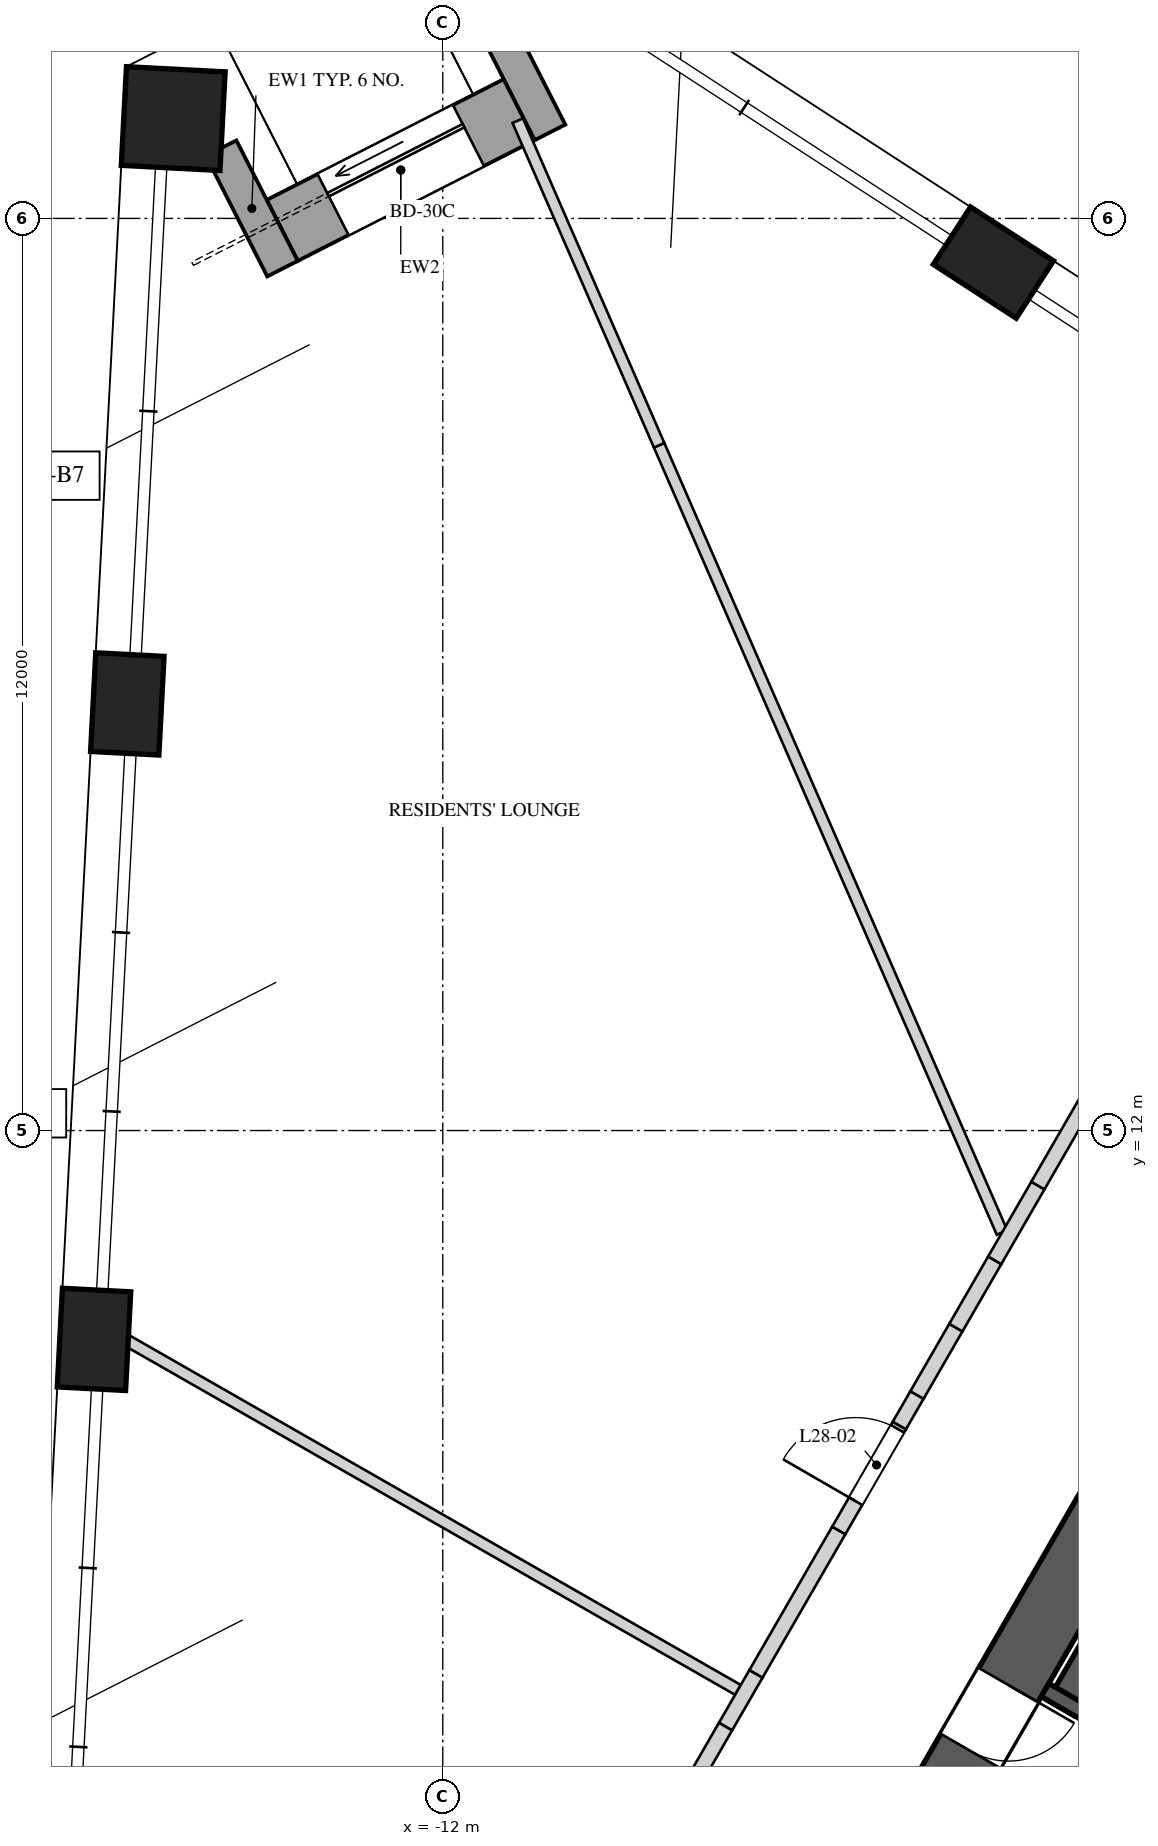
"""IFC4 building model, lengths in metres.
Left out: names, types, materials, properties, quantities, classifications, styles, units other than length and angle.
Written with IfcOpenShell. Run it as: python <this file> out.ifc"""

import sys

from ifc_helpers import new_model, si_unit, direction, frame, frame_2d, origin, origin_2d, place, context, subcontext, project, spatial, polyline, rectangle, outline, extrude, element, fill, save


model = new_model("IFC4")
c1 = context("Model", 3, precision=1e-05, world=origin(), true_north=direction((0.0, 1.0)))
c2 = subcontext(c1, "Body", "Model", "MODEL_VIEW")
j1 = project(units=[si_unit("LENGTHUNIT", "METRE"), si_unit("PLANEANGLEUNIT", "RADIAN")], contexts=[c1])
p1 = place(None, origin())
s1 = spatial("IfcSite", under=j1, at=p1, CompositionType="ELEMENT")
p2 = place(p1, origin())
s2 = spatial("IfcBuilding", under=s1, at=p2, CompositionType="ELEMENT")
p3 = place(p2, frame((0.0, 0.0, 125.6)))
s3 = spatial("IfcBuildingStorey", under=s2, at=p3, CompositionType="ELEMENT", Elevation=125.6)
p4 = place(p3, frame((-1.184, 10.55, 0.0), z_axis=(0.0, 0.0, 1.0), x_axis=(-0.500004814304, -0.866022624227, 0.0)))
e1 = element("IfcWall", 1, at=p4, inside=s3, PredefinedType="SHEAR", context=c2, shape_type="SweptSolid", body=[
    extrude(rectangle(XDim=17.09, YDim=0.9, at=frame_2d((8.545, 0.0))), origin(), (0.0, 0.0, 1.0), 4.0),
])
p5 = place(p4, frame((6.75, 0.0, 0.0)))
e2 = element("IfcOpeningElement", 2, at=p5, cuts=e1, PredefinedType="OPENING", context=c2, shape_type="SweptSolid", body=[
    extrude(rectangle(XDim=1.0, YDim=2.4, at=frame_2d((0.5, 1.2))), frame((0.0, 0.46, 0.0), z_axis=(0.0, -1.0, 0.0), x_axis=(1.0, 0.0, 0.0)), (0.0, 0.0, 1.0), 0.92),
])
p6 = place(p4, frame((14.678, 0.0, 0.0)))
e3 = element("IfcOpeningElement", 3, at=p6, cuts=e1, PredefinedType="OPENING", context=c2, shape_type="SweptSolid", body=[
    extrude(rectangle(XDim=0.8, YDim=2.1, at=frame_2d((0.4, 1.05))), frame((0.0, 0.46, 0.0), z_axis=(0.0, -1.0, 0.0), x_axis=(1.0, 0.0, 0.0)), (0.0, 0.0, 1.0), 0.92),
])
p7 = place(p3, frame((-15.547, 25.313, -0.35), z_axis=(0.0, 0.0, 1.0), x_axis=(-0.052335956243, -0.998629534755, 0.0)))
e4 = element("IfcColumn", 4, at=p7, inside=s3, PredefinedType="COLUMN", context=c2, shape_type="SweptSolid", body=[
    extrude(rectangle(XDim=1.3, YDim=1.3, at=origin_2d()), origin(), (0.0, 0.0, 1.0), 4.35),
])
for number, where, z_axis, x_axis in (
    (5, (-16.15, 17.613, -0.35), (0.0, 0.0, 1.0), (-0.052, -0.999, 0.0)),
    (6, (-16.588, 9.252, -0.35), (0.0, 0.0, 1.0), (-0.052, -0.999, 0.0)),
    (7, (-4.756, 23.418, -0.35), (0.0, 0.0, 1.0), (-0.839, 0.545, 0.0)),
):
    element("IfcColumn", number, at=place(p3, frame(where, z_axis=z_axis, x_axis=x_axis)), inside=s3, PredefinedType="COLUMN", context=c2, shape_type="SweptSolid", body=[
        extrude(rectangle(XDim=1.3, YDim=0.9, at=origin_2d()), origin(), (0.0, 0.0, 1.0), 4.35),
    ])
p8 = place(p3, frame((-14.112, 23.842, 0.0), z_axis=(0.0, 0.0, 1.0), x_axis=(0.890983062796, 0.454036542374, 0.0)))
e8 = element("IfcWall", 8, at=p8, inside=s3, PredefinedType="SOLIDWALL", context=c2, shape_type="SweptSolid", body=[
    extrude(rectangle(XDim=3.5, YDim=0.9, at=frame_2d((1.75, 0.0))), origin(), (0.0, 0.0, 1.0), 3.3),
])
p9 = place(p8, frame((0.75, 0.0, 0.0)))
e9 = element("IfcOpeningElement", 9, at=p9, cuts=e8, PredefinedType="OPENING", context=c2, shape_type="SweptSolid", body=[
    extrude(rectangle(XDim=2.0, YDim=2.4, at=frame_2d((1.0, 1.2))), frame((0.0, 0.46, 0.0), z_axis=(0.0, -1.0, 0.0), x_axis=(1.0, 0.0, 0.0)), (0.0, 0.0, 1.0), 0.92),
])
for number, where, z_axis, x_axis in (
    (10, (-14.916, 24.924, 0.0), (0.0, 0.0, 1.0), (0.454, -0.891, 0.0)),
    (11, (-11.396, 26.717, 0.0), (0.0, 0.0, 1.0), (0.454, -0.891, 0.0)),
):
    element("IfcWall", number, at=place(p3, frame(where, z_axis=z_axis, x_axis=x_axis)), inside=s3, PredefinedType="SOLIDWALL", context=c2, shape_type="SweptSolid", body=[
        extrude(rectangle(XDim=1.779, YDim=0.45, at=frame_2d((0.89, 0.0))), origin(), (0.0, 0.0, 1.0), 2.55),
    ])
p10 = place(p3, frame((-0.766, 9.772, 0.0), z_axis=(0.0, 0.0, 1.0), x_axis=(-0.500009909098, -0.866019682689, 0.0)))
e12 = element("IfcWall", 12, at=p10, inside=s3, PredefinedType="SOLIDWALL", context=c2, shape_type="SweptSolid", body=[
    extrude(rectangle(XDim=6.2, YDim=0.4, at=frame_2d((3.1, 0.0))), origin(), (0.0, 0.0, 1.0), 3.65),
])
p11 = place(p3, frame((-1.521, 3.165, 0.0), z_axis=(0.0, 0.0, 1.0), x_axis=(-0.866039495442, 0.49997559174, 0.0)))
e13 = element("IfcWall", 13, at=p11, inside=s3, PredefinedType="SOLIDWALL", context=c2, shape_type="SweptSolid", body=[
    extrude(rectangle(XDim=2.95, YDim=0.2, at=frame_2d((1.475, 0.0))), origin(), (0.0, 0.0, 1.0), 3.65),
])
p12 = place(p11, frame((0.725, 0.0, 0.0)))
e14 = element("IfcOpeningElement", 14, at=p12, cuts=e13, PredefinedType="OPENING", context=c2, shape_type="SweptSolid", body=[
    extrude(rectangle(XDim=1.1, YDim=2.4, at=frame_2d((0.55, 1.2))), frame((0.0, 0.11, 0.0), z_axis=(0.0, -1.0, 0.0), x_axis=(1.0, 0.0, 0.0)), (0.0, 0.0, 1.0), 0.22),
])
p13 = place(p3, frame((-8.117, 4.641, 0.0), z_axis=(0.0, 0.0, 1.0), x_axis=(-0.868089906789, 0.496407004111, 0.0)))
e15 = element("IfcWall", 15, at=p13, inside=s3, PredefinedType="PARTITIONING", context=c2, shape_type="SweptSolid", body=[
    extrude(rectangle(XDim=9.611, YDim=0.15, at=frame_2d((4.806, 0.0))), origin(), (0.0, 0.0, 1.0), 2.75),
])
p14 = place(p3, frame((-4.643, 10.659, 0.0), z_axis=(0.0, 0.0, 1.0), x_axis=(-0.399345585852, 0.916800470692, 0.0)))
e16 = element("IfcWall", 16, at=p14, inside=s3, PredefinedType="PARTITIONING", context=c2, shape_type="SweptSolid", body=[
    extrude(rectangle(XDim=11.297, YDim=0.15, at=frame_2d((5.648, 0.0))), origin(), (0.0, 0.0, 1.0), 2.55),
])
p15 = place(p3, frame((-9.154, 21.015, 0.0), z_axis=(0.0, 0.0, 1.0), x_axis=(-0.399333563101, 0.916805707542, 0.0)))
e17 = element("IfcWall", 17, at=p15, inside=s3, PredefinedType="PARTITIONING", context=c2, shape_type="SweptSolid", body=[
    extrude(rectangle(XDim=4.658, YDim=0.15, at=frame_2d((2.329, 0.0))), origin(), (0.0, 0.0, 1.0), 3.65),
])
p16 = place(p3, frame((-10.171, 0.884, 0.0), z_axis=(0.0, 0.0, 1.0), x_axis=(0.499998034377, 0.866026538634, 0.0)))
e18 = element("IfcWall", 18, at=p16, inside=s3, PredefinedType="SOLIDWALL", context=c2, shape_type="SweptSolid", body=[
    extrude(rectangle(XDim=3.783, YDim=0.2, at=frame_2d((1.892, 0.0))), origin(), (0.0, 0.0, 1.0), 3.65),
])
p17 = place(p3, frame((-8.279, 4.16, 0.0), z_axis=(0.0, 0.0, 1.0), x_axis=(0.500109828528, 0.865961984968, 0.0)))
e19 = element("IfcWall", 19, at=p17, inside=s3, PredefinedType="SOLIDWALL", context=c2, shape_type="SweptSolid", body=[
    extrude(rectangle(XDim=0.8, YDim=0.2, at=frame_2d((0.4, 0.0))), origin(), (0.0, 0.0, 1.0), 2.75),
])
p18 = place(p3, frame((-7.879, 4.853, 0.0), z_axis=(0.0, 0.0, 1.0), x_axis=(0.499948868167, 0.866054922749, 0.0)))
e20 = element("IfcWall", 20, at=p18, inside=s3, PredefinedType="SOLIDWALL", context=c2, shape_type="SweptSolid", body=[
    extrude(rectangle(XDim=2.178, YDim=0.2, at=frame_2d((1.089, 0.0))), origin(), (0.0, 0.0, 1.0), 3.65),
])
p19 = place(p3, frame((-6.79, 6.739, 0.0), z_axis=(0.0, 0.0, 1.0), x_axis=(0.500009674092, 0.866019818373, 0.0)))
e21 = element("IfcWall", 21, at=p19, inside=s3, PredefinedType="SOLIDWALL", context=c2, shape_type="SweptSolid", body=[
    extrude(outline(polyline([(0.0, 0.0), (1.594, 0.0), (1.594, 3.65), (0.944, 3.65), (0.944, 2.55), (0.0, 2.55), (0.0, 0.0)])), frame((0.0, 0.1, 0.0), z_axis=(0.0, -1.0, 0.0), x_axis=(1.0, 0.0, 0.0)), (0.0, 0.0, 1.0), 0.2),
])
p20 = place(p19, frame((0.444, 0.0, 0.0)))
e22 = element("IfcOpeningElement", 22, at=p20, cuts=e21, PredefinedType="OPENING", context=c2, shape_type="SweptSolid", body=[
    extrude(rectangle(XDim=1.1, YDim=2.4, at=frame_2d((0.55, 1.2))), frame((0.0, 0.11, 0.0), z_axis=(0.0, -1.0, 0.0), x_axis=(1.0, 0.0, 0.0)), (0.0, 0.0, 1.0), 0.22),
])
p21 = place(p3, frame((-5.993, 8.12, 0.0), z_axis=(0.0, 0.0, 1.0), x_axis=(0.499935264145, 0.866062775822, 0.0)))
e23 = element("IfcWall", 23, at=p21, inside=s3, PredefinedType="SOLIDWALL", context=c2, shape_type="SweptSolid", body=[
    extrude(rectangle(XDim=0.463, YDim=0.2, at=frame_2d((0.232, 0.0))), origin(), (0.0, 0.0, 1.0), 3.65),
])
p22 = place(p3, frame((-5.761, 8.521, 0.0), z_axis=(0.0, 0.0, 1.0), x_axis=(0.500114680815, 0.86595918266, 0.0)))
e24 = element("IfcWall", 24, at=p22, inside=s3, PredefinedType="SOLIDWALL", context=c2, shape_type="SweptSolid", body=[
    extrude(rectangle(XDim=1.024, YDim=0.2, at=frame_2d((0.512, 0.0))), origin(), (0.0, 0.0, 1.0), 2.55),
])
p23 = place(p3, frame((-5.25, 9.407, 0.0), z_axis=(0.0, 0.0, 1.0), x_axis=(0.499991148707, 0.866030514021, 0.0)))
e25 = element("IfcWall", 25, at=p23, inside=s3, PredefinedType="SOLIDWALL", context=c2, shape_type="SweptSolid", body=[
    extrude(rectangle(XDim=1.022, YDim=0.2, at=frame_2d((0.511, 0.0))), origin(), (0.0, 0.0, 1.0), 3.65),
])
p24 = place(p3, frame((-4.738, 10.293, 0.0), z_axis=(0.0, 0.0, 1.0), x_axis=(0.500001688065, 0.866024429177, 0.0)))
e26 = element("IfcWall", 26, at=p24, inside=s3, PredefinedType="SOLIDWALL", context=c2, shape_type="SweptSolid", body=[
    extrude(rectangle(XDim=1.135, YDim=0.2, at=frame_2d((0.568, 0.0))), origin(), (0.0, 0.0, 1.0), 2.55),
])
p25 = place(p3, frame((-4.171, 11.276, 0.0), z_axis=(0.0, 0.0, 1.0), x_axis=(0.50001992892, 0.866013897511, 0.0)))
e27 = element("IfcWall", 27, at=p25, inside=s3, PredefinedType="SOLIDWALL", context=c2, shape_type="SweptSolid", body=[
    extrude(rectangle(XDim=2.179, YDim=0.2, at=frame_2d((1.089, 0.0))), origin(), (0.0, 0.0, 1.0), 3.65),
])
p26 = place(p9, origin())
e28 = element("IfcDoor", 28, at=p26, inside=s3, OperationType="SLIDING_TO_LEFT", PredefinedType="DOOR", context=c2, shape_type="SweptSolid", body=[
    extrude(rectangle(XDim=2.0, YDim=2.4, at=frame_2d((1.0, 1.2))), frame((0.0, 0.025, 0.0), z_axis=(0.0, -1.0, 0.0), x_axis=(1.0, 0.0, 0.0)), (0.0, 0.0, 1.0), 0.05),
])
fill(e9, e28)
p27 = place(p5, origin())
e29 = element("IfcDoor", 29, at=p27, inside=s3, OperationType="SINGLE_SWING_RIGHT", PredefinedType="DOOR", context=c2, shape_type="SweptSolid", body=[
    extrude(rectangle(XDim=1.0, YDim=2.4, at=frame_2d((0.5, 1.2))), frame((0.0, 0.025, 0.0), z_axis=(0.0, -1.0, 0.0), x_axis=(1.0, 0.0, 0.0)), (0.0, 0.0, 1.0), 0.05),
])
fill(e2, e29)
p28 = place(p20, origin())
e30 = element("IfcDoor", 30, at=p28, inside=s3, OperationType="SINGLE_SWING_RIGHT", PredefinedType="DOOR", context=c2, shape_type="SweptSolid", body=[
    extrude(rectangle(XDim=1.1, YDim=2.4, at=frame_2d((0.55, 1.2))), frame((0.0, 0.025, 0.0), z_axis=(0.0, -1.0, 0.0), x_axis=(1.0, 0.0, 0.0)), (0.0, 0.0, 1.0), 0.05),
])
fill(e22, e30)
save(model, sys.argv[1])
